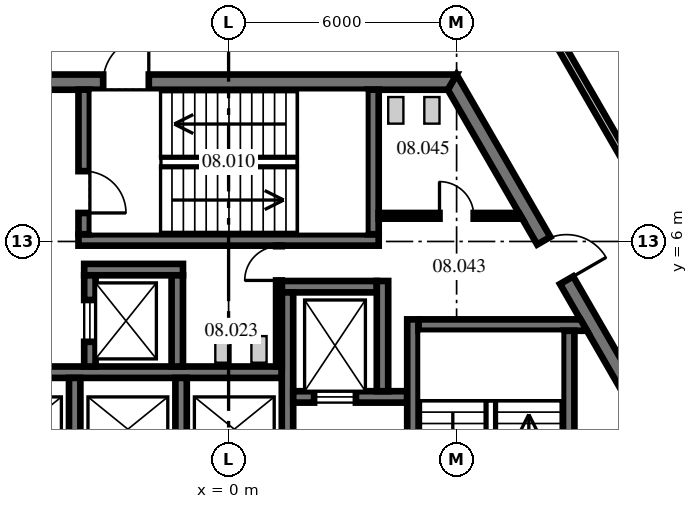
"""IFC4 building model, lengths in metres.
Left out: names, types, materials, properties, quantities, classifications, styles, units other than length and angle.
Written with IfcOpenShell. Run it as: python <this file> out.ifc"""

import sys

from ifc_helpers import new_model, si_unit, direction, frame, frame_2d, origin, place, context, subcontext, project, spatial, polyline, rectangle, outline, extrude, source, transform, mapped, element, fill, save


model = new_model("IFC4")
c1 = context("Model", 3, precision=1e-05, world=origin(), true_north=direction((0.0, 1.0)))
c2 = subcontext(c1, "Body", "Model", "MODEL_VIEW")
j1 = project(units=[si_unit("LENGTHUNIT", "METRE"), si_unit("PLANEANGLEUNIT", "RADIAN")], contexts=[c1])
p1 = place(None, origin())
s1 = spatial("IfcSite", under=j1, at=p1, CompositionType="ELEMENT")
p2 = place(p1, origin())
s2 = spatial("IfcBuilding", under=s1, at=p2, CompositionType="ELEMENT")
p3 = place(p2, frame((0.0, 0.0, 37.5)))
s3 = spatial("IfcBuildingStorey", under=s2, at=p3, CompositionType="ELEMENT", Elevation=37.5)
m1 = source(origin(), c2, "Body", "SweptSolid", [
    extrude(outline(polyline([(-0.115, -0.2), (11.885, -0.2), (11.654, 0.2), (0.115, 0.2), (-0.115, -0.2)])), origin(), (0.0, 0.0, 1.0), 4.1),
])
p4 = place(p3, frame((11.769, 0.0, 0.0), z_axis=(0.0, 0.0, 1.0), x_axis=(-0.499996592174, 0.866027371285, 0.0)))
e1 = element("IfcWall", 1, at=p4, inside=s3, PredefinedType="SHEAR", context=c2, shape_type="MappedRepresentation", body=[
    mapped(m1, transform((0.0, 0.0, 0.0), scale=1.0)),
])
p5 = place(p4, frame((5.75, 0.0, 0.0)))
e2 = element("IfcOpeningElement", 2, at=p5, cuts=e1, PredefinedType="OPENING", context=c2, shape_type="SweptSolid", body=[
    extrude(rectangle(XDim=1.2, YDim=2.1, at=frame_2d((0.6, 1.05))), frame((0.0, 0.21, 0.0), z_axis=(0.0, -1.0, 0.0), x_axis=(1.0, 0.0, 0.0)), (0.0, 0.0, 1.0), 0.42),
])
p6 = place(p3, frame((5.885, 10.192, 0.0), z_axis=(0.0, 0.0, 1.0), x_axis=(-1.0, 0.0, 0.0)))
e3 = element("IfcWall", 3, at=p6, inside=s3, PredefinedType="SHEAR", context=c2, shape_type="MappedRepresentation", body=[
    mapped(m1, transform((0.0, 0.0, 0.0), scale=1.0)),
])
p7 = place(p6, frame((7.985, 0.0, 0.0)))
e4 = element("IfcOpeningElement", 4, at=p7, cuts=e3, PredefinedType="OPENING", context=c2, shape_type="SweptSolid", body=[
    extrude(rectangle(XDim=1.2, YDim=2.1, at=frame_2d((0.6, 1.05))), frame((0.0, 0.21, 0.0), z_axis=(0.0, -1.0, 0.0), x_axis=(1.0, 0.0, 0.0)), (0.0, 0.0, 1.0), 0.42),
])
m2 = source(origin(), c2, "Body", "SweptSolid", [
    extrude(outline(polyline([(11.2, -0.15), (-0.349, -0.15), (-0.176, 0.15), (11.2, 0.15), (11.2, -0.15)])), origin(), (0.0, 0.0, 1.0), 4.1),
])
p8 = place(p3, frame((-9.8, 2.56, 0.0), z_axis=(0.0, 0.0, 1.0), x_axis=(1.0, 0.0, 0.0)))
e5 = element("IfcWall", 5, at=p8, inside=s3, PredefinedType="SHEAR", context=c2, shape_type="MappedRepresentation", body=[
    mapped(m2, transform((0.0, 0.0, 0.0), scale=1.0)),
])
m3 = source(origin(), c2, "Body", "SweptSolid", [
    extrude(rectangle(XDim=2.5, YDim=0.3, at=frame_2d((1.25, 0.0))), origin(), (0.0, 0.0, 1.0), 4.1),
])
p9 = place(p3, frame((1.4, 4.81, 0.0), z_axis=(0.0, 0.0, 1.0), x_axis=(1.0, 0.0, 0.0)))
e6 = element("IfcWall", 6, at=p9, inside=s3, PredefinedType="SHEAR", context=c2, shape_type="MappedRepresentation", body=[
    mapped(m3, transform((0.0, 0.0, 0.0), scale=1.0)),
])
m4 = source(origin(), c2, "Body", "SweptSolid", [
    extrude(rectangle(XDim=4.45, YDim=0.3, at=frame_2d((2.225, 0.0))), origin(), (0.0, 0.0, 1.0), 4.1),
])
p10 = place(p3, frame((1.55, 0.21, 0.0), z_axis=(0.0, 0.0, 1.0), x_axis=(0.0, 1.0, 0.0)))
e7 = element("IfcWall", 7, at=p10, inside=s3, PredefinedType="SHEAR", context=c2, shape_type="MappedRepresentation", body=[
    mapped(m4, transform((0.0, 0.0, 0.0), scale=1.0)),
])
m5 = source(origin(), c2, "Body", "SweptSolid", [
    extrude(rectangle(XDim=3.0, YDim=0.3, at=frame_2d((1.5, 0.0))), origin(), (0.0, 0.0, 1.0), 4.1),
])
p11 = place(p3, frame((1.7, 1.91, 0.0), z_axis=(0.0, 0.0, 1.0), x_axis=(1.0, 0.0, 0.0)))
e8 = element("IfcWall", 8, at=p11, inside=s3, PredefinedType="SHEAR", context=c2, shape_type="MappedRepresentation", body=[
    mapped(m5, transform((0.0, 0.0, 0.0), scale=1.0)),
])
p12 = place(p11, frame((0.55, 0.0, 0.0)))
e9 = element("IfcOpeningElement", 9, at=p12, cuts=e8, PredefinedType="OPENING", context=c2, shape_type="SweptSolid", body=[
    extrude(rectangle(XDim=1.1, YDim=2.1, at=frame_2d((0.55, 1.05))), frame((0.0, 0.16, 0.0), z_axis=(0.0, -1.0, 0.0), x_axis=(1.0, 0.0, 0.0)), (0.0, 0.0, 1.0), 0.32),
])
m6 = source(origin(), c2, "Body", "SweptSolid", [
    extrude(rectangle(XDim=2.9, YDim=0.3, at=frame_2d((1.45, 0.0))), origin(), (0.0, 0.0, 1.0), 4.1),
])
p13 = place(p3, frame((4.05, 2.06, 0.0), z_axis=(0.0, 0.0, 1.0), x_axis=(0.0, 1.0, 0.0)))
e10 = element("IfcWall", 10, at=p13, inside=s3, PredefinedType="SHEAR", context=c2, shape_type="MappedRepresentation", body=[
    mapped(m6, transform((0.0, 0.0, 0.0), scale=1.0)),
])
m7 = source(origin(), c2, "Body", "SweptSolid", [
    extrude(outline(polyline([(-0.15, -0.15), (9.99, -0.15), (9.99, 0.15), (0.15, 0.15), (-0.15, -0.15)])), origin(), (0.0, 0.0, 1.0), 4.1),
])
p14 = place(p3, frame((4.85, -6.04, 0.0), z_axis=(0.0, 0.0, 1.0), x_axis=(0.0, 1.0, 0.0)))
e11 = element("IfcWall", 11, at=p14, inside=s3, PredefinedType="SHEAR", context=c2, shape_type="MappedRepresentation", body=[
    mapped(m7, transform((0.0, 0.0, 0.0), scale=1.0)),
])
p15 = place(p14, frame((3.19, 0.0, 0.0)))
e12 = element("IfcOpeningElement", 12, at=p15, cuts=e11, PredefinedType="OPENING", context=c2, shape_type="SweptSolid", body=[
    extrude(rectangle(XDim=1.1, YDim=2.1, at=frame_2d((0.55, 1.05))), frame((0.0, 0.16, 0.0), z_axis=(0.0, -1.0, 0.0), x_axis=(1.0, 0.0, 0.0)), (0.0, 0.0, 1.0), 0.32),
])
m8 = source(origin(), c2, "Body", "SweptSolid", [
    extrude(outline(polyline([(0.0, -0.15), (0.0, 0.15), (4.26, 0.15), (4.433, -0.15), (0.0, -0.15)])), origin(), (0.0, 0.0, 1.0), 4.1),
])
p16 = place(p3, frame((5.0, 3.8, 0.0), z_axis=(0.0, 0.0, 1.0), x_axis=(1.0, 0.0, 0.0)))
e13 = element("IfcWall", 13, at=p16, inside=s3, PredefinedType="SHEAR", context=c2, shape_type="MappedRepresentation", body=[
    mapped(m8, transform((0.0, 0.0, 0.0), scale=1.0)),
])
m9 = source(origin(), c2, "Body", "SweptSolid", [
    extrude(rectangle(XDim=7.3, YDim=0.3, at=frame_2d((3.65, 0.0))), origin(), (0.0, 0.0, 1.0), 4.1),
])
p17 = place(p3, frame((8.95, -3.65, 0.0), z_axis=(0.0, 0.0, 1.0), x_axis=(0.0, 1.0, 0.0)))
e14 = element("IfcWall", 14, at=p17, inside=s3, PredefinedType="SHEAR", context=c2, shape_type="MappedRepresentation", body=[
    mapped(m9, transform((0.0, 0.0, 0.0), scale=1.0)),
])
m10 = source(origin(), c2, "Body", "SweptSolid", [
    extrude(rectangle(XDim=7.9, YDim=0.3, at=frame_2d((3.95, 0.0))), origin(), (0.0, 0.0, 1.0), 4.1),
])
p18 = place(p3, frame((-3.95, 6.04, 0.0), z_axis=(0.0, 0.0, 1.0), x_axis=(1.0, 0.0, 0.0)))
e15 = element("IfcWall", 15, at=p18, inside=s3, PredefinedType="SHEAR", context=c2, shape_type="MappedRepresentation", body=[
    mapped(m10, transform((0.0, 0.0, 0.0), scale=1.0)),
])
m11 = source(origin(), c2, "Body", "SweptSolid", [
    extrude(outline(polyline([(0.0, -0.15), (0.0, 0.15), (3.804, 0.15), (3.804, -0.15), (0.0, -0.15)])), origin(), (0.0, 0.0, 1.0), 4.1),
])
p19 = place(p3, frame((-3.8, 6.19, 0.0), z_axis=(0.0, 0.0, 1.0), x_axis=(0.0, 1.0, 0.0)))
e16 = element("IfcWall", 16, at=p19, inside=s3, PredefinedType="SHEAR", context=c2, shape_type="MappedRepresentation", body=[
    mapped(m11, transform((0.0, 0.0, 0.0), scale=1.0)),
])
p20 = place(p19, frame((0.56, 0.0, 0.0)))
e17 = element("IfcOpeningElement", 17, at=p20, cuts=e16, PredefinedType="OPENING", context=c2, shape_type="SweptSolid", body=[
    extrude(rectangle(XDim=1.1, YDim=2.1, at=frame_2d((0.55, 1.05))), frame((0.0, 0.16, 0.0), z_axis=(0.0, -1.0, 0.0), x_axis=(1.0, 0.0, 0.0)), (0.0, 0.0, 1.0), 0.32),
])
p21 = place(p3, frame((3.8, 6.19, 0.0), z_axis=(0.0, 0.0, 1.0), x_axis=(0.0, 1.0, 0.0)))
e18 = element("IfcWall", 18, at=p21, inside=s3, PredefinedType="SHEAR", context=c2, shape_type="MappedRepresentation", body=[
    mapped(m11, transform((0.0, 0.0, 0.0), scale=1.0)),
])
m12 = source(origin(), c2, "Body", "SweptSolid", [
    extrude(rectangle(XDim=2.6, YDim=0.3, at=frame_2d((1.3, 0.0))), origin(), (0.0, 0.0, 1.0), 4.1),
])
p22 = place(p3, frame((-3.8, 5.26, 0.0), z_axis=(0.0, 0.0, 1.0), x_axis=(1.0, 0.0, 0.0)))
e19 = element("IfcWall", 19, at=p22, inside=s3, PredefinedType="SHEAR", context=c2, shape_type="MappedRepresentation", body=[
    mapped(m12, transform((0.0, 0.0, 0.0), scale=1.0)),
])
m13 = source(origin(), c2, "Body", "SweptSolid", [
    extrude(rectangle(XDim=2.4, YDim=0.3, at=frame_2d((1.2, 0.0))), origin(), (0.0, 0.0, 1.0), 4.1),
])
p23 = place(p3, frame((-3.65, 2.71, 0.0), z_axis=(0.0, 0.0, 1.0), x_axis=(0.0, 1.0, 0.0)))
e20 = element("IfcWall", 20, at=p23, inside=s3, PredefinedType="SHEAR", context=c2, shape_type="MappedRepresentation", body=[
    mapped(m13, transform((0.0, 0.0, 0.0), scale=1.0)),
])
p24 = place(p23, frame((0.65, 0.0, 0.0)))
e21 = element("IfcOpeningElement", 21, at=p24, cuts=e20, PredefinedType="OPENING", context=c2, shape_type="SweptSolid", body=[
    extrude(rectangle(XDim=1.1, YDim=2.1, at=frame_2d((0.55, 1.05))), frame((0.0, 0.16, 0.0), z_axis=(0.0, -1.0, 0.0), x_axis=(1.0, 0.0, 0.0)), (0.0, 0.0, 1.0), 0.32),
])
p25 = place(p3, frame((-1.35, 2.71, 0.0), z_axis=(0.0, 0.0, 1.0), x_axis=(0.0, 1.0, 0.0)))
e22 = element("IfcWall", 22, at=p25, inside=s3, PredefinedType="SHEAR", context=c2, shape_type="MappedRepresentation", body=[
    mapped(m13, transform((0.0, 0.0, 0.0), scale=1.0)),
])
m14 = source(origin(), c2, "Body", "SweptSolid", [
    extrude(rectangle(XDim=3.18, YDim=0.15, at=frame_2d((1.59, 0.0))), origin(), (0.0, 0.0, 1.0), 4.1),
])
p26 = place(p3, frame((1.325, 2.71, 0.0), z_axis=(0.0, 0.0, 1.0), x_axis=(0.0, 1.0, 0.0)))
e23 = element("IfcWall", 23, at=p26, inside=s3, PredefinedType="PARTITIONING", context=c2, shape_type="MappedRepresentation", body=[
    mapped(m14, transform((0.0, 0.0, 0.0), scale=1.0)),
])
p27 = place(p26, frame((2.265, 0.0, 0.0)))
e24 = element("IfcOpeningElement", 24, at=p27, cuts=e23, PredefinedType="OPENING", context=c2, shape_type="SweptSolid", body=[
    extrude(rectangle(XDim=0.9, YDim=2.1, at=frame_2d((0.45, 1.05))), frame((0.0, 0.085, 0.0), z_axis=(0.0, -1.0, 0.0), x_axis=(1.0, 0.0, 0.0)), (0.0, 0.0, 1.0), 0.17),
])
m15 = source(origin(), c2, "Body", "SweptSolid", [
    extrude(outline(polyline([(0.0, -0.075), (0.0, 0.075), (3.693, 0.075), (3.78, -0.075), (0.0, -0.075)])), origin(), (0.0, 0.0, 1.0), 4.1),
])
p28 = place(p3, frame((3.95, 6.675, 0.0), z_axis=(0.0, 0.0, 1.0), x_axis=(1.0, 0.0, 0.0)))
e25 = element("IfcWall", 25, at=p28, inside=s3, PredefinedType="PARTITIONING", context=c2, shape_type="MappedRepresentation", body=[
    mapped(m15, transform((0.0, 0.0, 0.0), scale=1.0)),
])
p29 = place(p28, frame((1.6, 0.0, 0.0)))
e26 = element("IfcOpeningElement", 26, at=p29, cuts=e25, PredefinedType="OPENING", context=c2, shape_type="SweptSolid", body=[
    extrude(rectangle(XDim=0.9, YDim=2.1, at=frame_2d((0.45, 1.05))), frame((0.0, 0.085, 0.0), z_axis=(0.0, -1.0, 0.0), x_axis=(1.0, 0.0, 0.0)), (0.0, 0.0, 1.0), 0.17),
])
m16 = source(origin(), c2, "Body", "SweptSolid", [
    extrude(rectangle(XDim=2.2, YDim=0.3, at=frame_2d((1.1, 0.0))), origin(), (0.0, 0.0, 1.0), 4.1),
])
for number, where, z_axis, x_axis in (
    (27, (-4.05, 0.21, 0.0), (0.0, 0.0, 1.0), (0.0, 1.0, 0.0)),
    (28, (-1.25, 0.21, 0.0), (0.0, 0.0, 1.0), (0.0, 1.0, 0.0)),
):
    element("IfcWall", number, at=place(p3, frame(where, z_axis=z_axis, x_axis=x_axis)), inside=s3, PredefinedType="SHEAR", context=c2, shape_type="MappedRepresentation", body=[
        mapped(m16, transform((0.0, 0.0, 0.0), scale=1.0)),
    ])
p30 = place(p3, frame((7.623, 13.082, 0.0), z_axis=(0.0, 0.0, 1.0), x_axis=(0.499985944963, -0.866033518312, 0.0)))
e29 = element("IfcWall", 29, at=p30, inside=s3, PredefinedType="PARTITIONING", context=c2, shape_type="SweptSolid", body=[
    extrude(rectangle(XDim=15.105, YDim=0.2, at=frame_2d((7.553, 0.0))), origin(), (0.0, 0.0, 1.0), 4.1),
])
p31 = place(p30, frame((9.455, 0.0, 0.0)))
e30 = element("IfcOpeningElement", 30, at=p31, cuts=e29, PredefinedType="OPENING", context=c2, shape_type="SweptSolid", body=[
    extrude(rectangle(XDim=1.0, YDim=2.1, at=frame_2d((0.5, 1.05))), frame((0.0, 0.11, 0.0), z_axis=(0.0, -1.0, 0.0), x_axis=(1.0, 0.0, 0.0)), (0.0, 0.0, 1.0), 0.22),
])
p32 = place(p7, frame((1.2, 0.0, 0.0), z_axis=(0.0, 0.0, 1.0), x_axis=(-1.0, 0.0, 0.0)))
e31 = element("IfcDoor", 31, at=p32, inside=s3, OperationType="SINGLE_SWING_RIGHT", PredefinedType="DOOR", context=c2, shape_type="SweptSolid", body=[
    extrude(rectangle(XDim=1.2, YDim=2.1, at=frame_2d((0.6, 1.05))), frame((0.0, 0.025, 0.0), z_axis=(0.0, -1.0, 0.0), x_axis=(1.0, 0.0, 0.0)), (0.0, 0.0, 1.0), 0.05),
])
fill(e4, e31)
p33 = place(p5, frame((1.2, 0.0, 0.0), z_axis=(0.0, 0.0, 1.0), x_axis=(-1.0, 0.0, 0.0)))
e32 = element("IfcDoor", 32, at=p33, inside=s3, OperationType="SINGLE_SWING_RIGHT", PredefinedType="DOOR", context=c2, shape_type="SweptSolid", body=[
    extrude(rectangle(XDim=1.2, YDim=2.1, at=frame_2d((0.6, 1.05))), frame((0.0, 0.025, 0.0), z_axis=(0.0, -1.0, 0.0), x_axis=(1.0, 0.0, 0.0)), (0.0, 0.0, 1.0), 0.05),
])
fill(e2, e32)
p34 = place(p20, frame((1.1, 0.0, 0.0), z_axis=(0.0, 0.0, 1.0), x_axis=(-1.0, 0.0, 0.0)))
e33 = element("IfcDoor", 33, at=p34, inside=s3, OperationType="SINGLE_SWING_RIGHT", PredefinedType="DOOR", context=c2, shape_type="SweptSolid", body=[
    extrude(rectangle(XDim=1.1, YDim=2.1, at=frame_2d((0.55, 1.05))), frame((0.0, 0.025, 0.0), z_axis=(0.0, -1.0, 0.0), x_axis=(1.0, 0.0, 0.0)), (0.0, 0.0, 1.0), 0.05),
])
fill(e17, e33)
p35 = place(p27, origin())
e34 = element("IfcDoor", 34, at=p35, inside=s3, OperationType="SINGLE_SWING_LEFT", PredefinedType="DOOR", context=c2, shape_type="SweptSolid", body=[
    extrude(rectangle(XDim=0.9, YDim=2.1, at=frame_2d((0.45, 1.05))), frame((0.0, 0.025, 0.0), z_axis=(0.0, -1.0, 0.0), x_axis=(1.0, 0.0, 0.0)), (0.0, 0.0, 1.0), 0.05),
])
fill(e24, e34)
p36 = place(p29, origin())
e35 = element("IfcDoor", 35, at=p36, inside=s3, OperationType="SINGLE_SWING_LEFT", PredefinedType="DOOR", context=c2, shape_type="SweptSolid", body=[
    extrude(rectangle(XDim=0.9, YDim=2.1, at=frame_2d((0.45, 1.05))), frame((0.0, 0.025, 0.0), z_axis=(0.0, -1.0, 0.0), x_axis=(1.0, 0.0, 0.0)), (0.0, 0.0, 1.0), 0.05),
])
fill(e26, e35)
p37 = place(p12, origin())
e36 = element("IfcDoor", 36, at=p37, inside=s3, OperationType="DOUBLE_DOOR_SLIDING", PredefinedType="DOOR", context=c2, shape_type="SweptSolid", body=[
    extrude(rectangle(XDim=1.1, YDim=2.1, at=frame_2d((0.55, 1.05))), frame((0.0, 0.025, 0.0), z_axis=(0.0, -1.0, 0.0), x_axis=(1.0, 0.0, 0.0)), (0.0, 0.0, 1.0), 0.05),
])
fill(e9, e36)
p38 = place(p24, origin())
e37 = element("IfcDoor", 37, at=p38, inside=s3, OperationType="DOUBLE_DOOR_SLIDING", PredefinedType="DOOR", context=c2, shape_type="SweptSolid", body=[
    extrude(rectangle(XDim=1.1, YDim=2.1, at=frame_2d((0.55, 1.05))), frame((0.0, 0.025, 0.0), z_axis=(0.0, -1.0, 0.0), x_axis=(1.0, 0.0, 0.0)), (0.0, 0.0, 1.0), 0.05),
])
fill(e21, e37)
save(model, sys.argv[1])
